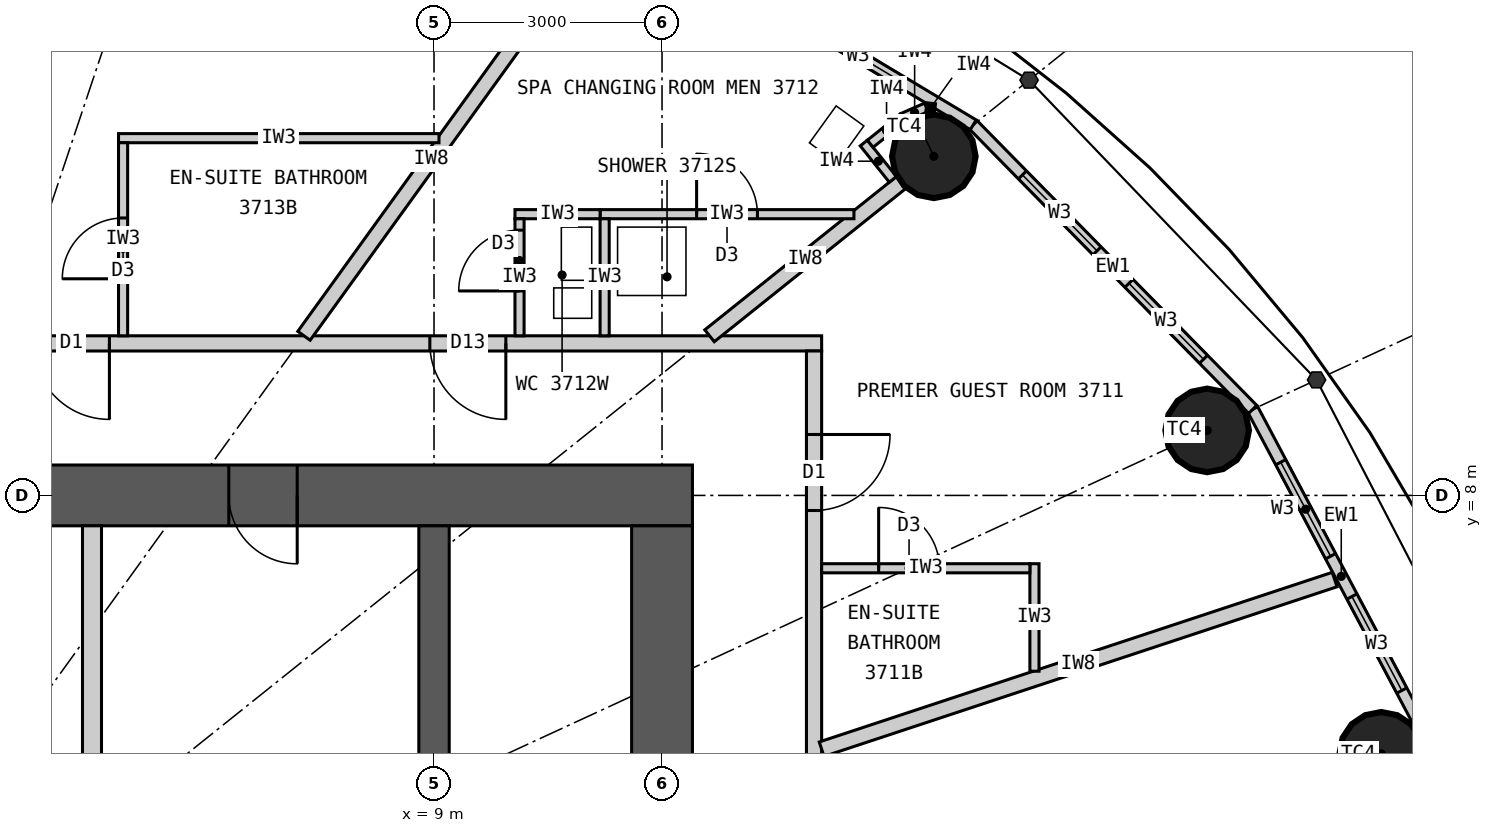
"""IFC4 building model, lengths in metres.
Left out: names, types, materials, properties, quantities, classifications, styles, units other than length and angle.
Written with IfcOpenShell. Run it as: python <this file> out.ifc"""

import sys

from ifc_helpers import new_model, si_unit, direction, frame, frame_2d, origin, origin_2d, place, context, subcontext, project, spatial, rectangle, circle, extrude, element, fill, save


model = new_model("IFC4")
c1 = context("Model", 3, precision=1e-05, world=origin(), true_north=direction((0.0, 1.0)))
c2 = subcontext(c1, "Body", "Model", "MODEL_VIEW")
j1 = project(units=[si_unit("LENGTHUNIT", "METRE"), si_unit("PLANEANGLEUNIT", "RADIAN")], contexts=[c1])
p1 = place(None, origin())
s1 = spatial("IfcSite", under=j1, at=p1, CompositionType="ELEMENT")
p2 = place(p1, origin())
s2 = spatial("IfcBuilding", under=s1, at=p2, CompositionType="ELEMENT")
p3 = place(p2, frame((0.0, 0.0, 143.4)))
s3 = spatial("IfcBuildingStorey", under=s2, at=p3, CompositionType="ELEMENT", Elevation=143.4)
for number, where, z_axis, x_axis in (
    (1, (21.463, 4.601, 0.0), (0.0, 0.0, 1.0), (1.0, 0.0, 0.0)),
    (2, (19.172, 8.855, 0.0), (0.0, 0.0, 1.0), (1.0, 0.0, 0.0)),
    (3, (15.576, 12.461, 0.0), (0.0, 0.0, 1.0), (1.0, 0.0, 0.0)),
):
    element("IfcColumn", number, at=place(p3, frame(where, z_axis=z_axis, x_axis=x_axis)), inside=s3, PredefinedType="COLUMN", context=c2, shape_type="SweptSolid", body=[
        extrude(circle(Radius=0.55, at=origin_2d()), origin(), (0.0, 0.0, 1.0), 3.3),
    ])
p4 = place(p3, frame((-12.4, 8.0, 0.0), z_axis=(0.0, 0.0, 1.0), x_axis=(1.0, 0.0, 0.0)))
e4 = element("IfcWall", 4, at=p4, inside=s3, PredefinedType="SHEAR", context=c2, shape_type="SweptSolid", body=[
    extrude(rectangle(XDim=24.8, YDim=0.8, at=frame_2d((12.4, 0.0))), origin(), (0.0, 0.0, 1.0), 3.3),
])
p5 = place(p4, frame((11.1, 0.0, 0.0)))
e5 = element("IfcOpeningElement", 5, at=p5, cuts=e4, PredefinedType="OPENING", context=c2, shape_type="SweptSolid", body=[
    extrude(rectangle(XDim=1.2, YDim=2.2, at=frame_2d((0.6, 1.1))), frame((0.0, 0.41, 0.0), z_axis=(0.0, -1.0, 0.0), x_axis=(1.0, 0.0, 0.0)), (0.0, 0.0, 1.0), 0.82),
])
p6 = place(p4, frame((18.7, 0.0, 0.0)))
e6 = element("IfcOpeningElement", 6, at=p6, cuts=e4, PredefinedType="OPENING", context=c2, shape_type="SweptSolid", body=[
    extrude(rectangle(XDim=0.9, YDim=2.2, at=frame_2d((0.45, 1.1))), frame((0.0, 0.41, 0.0), z_axis=(0.0, -1.0, 0.0), x_axis=(1.0, 0.0, 0.0)), (0.0, 0.0, 1.0), 0.82),
])
p7 = place(p3, frame((12.0, -7.6, 0.0), z_axis=(0.0, 0.0, 1.0), x_axis=(0.0, 1.0, 0.0)))
e7 = element("IfcWall", 7, at=p7, inside=s3, PredefinedType="SHEAR", context=c2, shape_type="SweptSolid", body=[
    extrude(rectangle(XDim=15.2, YDim=0.8, at=frame_2d((7.6, 0.0))), origin(), (0.0, 0.0, 1.0), 3.3),
])
p8 = place(p7, frame((6.7, 0.0, 0.0)))
e8 = element("IfcOpeningElement", 8, at=p8, cuts=e7, PredefinedType="OPENING", context=c2, shape_type="SweptSolid", body=[
    extrude(rectangle(XDim=1.8, YDim=2.2, at=frame_2d((0.9, 1.1))), frame((0.0, 0.41, 0.0), z_axis=(0.0, -1.0, 0.0), x_axis=(1.0, 0.0, 0.0)), (0.0, 0.0, 1.0), 0.82),
])
p9 = place(p3, frame((9.0, 4.5, 0.0), z_axis=(0.0, 0.0, 1.0), x_axis=(0.0, 1.0, 0.0)))
e9 = element("IfcWall", 9, at=p9, inside=s3, PredefinedType="SHEAR", context=c2, shape_type="SweptSolid", body=[
    extrude(rectangle(XDim=3.1, YDim=0.4, at=frame_2d((1.55, 0.0))), origin(), (0.0, 0.0, 1.0), 3.3),
])
p10 = place(p3, frame((4.5, 4.5, 0.0), z_axis=(0.0, 0.0, 1.0), x_axis=(0.0, 1.0, 0.0)))
e10 = element("IfcWall", 10, at=p10, inside=s3, PredefinedType="PARTITIONING", context=c2, shape_type="SweptSolid", body=[
    extrude(rectangle(XDim=3.1, YDim=0.25, at=frame_2d((1.55, 0.0))), origin(), (0.0, 0.0, 1.0), 3.3),
])
p11 = place(p3, frame((22.102, 4.738, 0.0), z_axis=(0.0, 0.0, 1.0), x_axis=(-0.468428906714, 0.883501193748, 0.0)))
e11 = element("IfcWall", 11, at=p11, inside=s3, PredefinedType="ELEMENTEDWALL", context=c2, shape_type="SweptSolid", body=[
    extrude(rectangle(XDim=4.974, YDim=0.15, at=frame_2d((2.487, 0.0))), origin(), (0.0, 0.0, 1.0), 3.12),
])
p12 = place(p11, frame((0.787, 0.0, 0.9)))
e12 = element("IfcOpeningElement", 12, at=p12, cuts=e11, PredefinedType="OPENING", context=c2, shape_type="SweptSolid", body=[
    extrude(rectangle(XDim=1.4, YDim=1.9, at=frame_2d((0.7, 0.95))), frame((0.0, 0.085, 0.0), z_axis=(0.0, -1.0, 0.0), x_axis=(1.0, 0.0, 0.0)), (0.0, 0.0, 1.0), 0.17),
])
p13 = place(p11, frame((2.787, 0.0, 0.9)))
e13 = element("IfcOpeningElement", 13, at=p13, cuts=e11, PredefinedType="OPENING", context=c2, shape_type="SweptSolid", body=[
    extrude(rectangle(XDim=1.4, YDim=1.9, at=frame_2d((0.7, 0.95))), frame((0.0, 0.085, 0.0), z_axis=(0.0, -1.0, 0.0), x_axis=(1.0, 0.0, 0.0)), (0.0, 0.0, 1.0), 0.17),
])
p14 = place(p3, frame((19.772, 9.132, 0.0), z_axis=(0.0, 0.0, 1.0), x_axis=(-0.700727467776, 0.71342905457, 0.0)))
e14 = element("IfcWall", 14, at=p14, inside=s3, PredefinedType="ELEMENTEDWALL", context=c2, shape_type="SweptSolid", body=[
    extrude(rectangle(XDim=5.247, YDim=0.15, at=frame_2d((2.624, 0.0))), origin(), (0.0, 0.0, 1.0), 3.12),
])
p15 = place(p14, frame((0.924, 0.0, 0.9)))
e15 = element("IfcOpeningElement", 15, at=p15, cuts=e14, PredefinedType="OPENING", context=c2, shape_type="SweptSolid", body=[
    extrude(rectangle(XDim=1.4, YDim=1.9, at=frame_2d((0.7, 0.95))), frame((0.0, 0.085, 0.0), z_axis=(0.0, -1.0, 0.0), x_axis=(1.0, 0.0, 0.0)), (0.0, 0.0, 1.0), 0.17),
])
p16 = place(p14, frame((2.924, 0.0, 0.9)))
e16 = element("IfcOpeningElement", 16, at=p16, cuts=e14, PredefinedType="OPENING", context=c2, shape_type="SweptSolid", body=[
    extrude(rectangle(XDim=1.4, YDim=1.9, at=frame_2d((0.7, 0.95))), frame((0.0, 0.085, 0.0), z_axis=(0.0, -1.0, 0.0), x_axis=(1.0, 0.0, 0.0)), (0.0, 0.0, 1.0), 0.17),
])
p17 = place(p3, frame((16.095, 12.876, 0.0), z_axis=(0.0, 0.0, 1.0), x_axis=(-0.857695199231, 0.514158482587, 0.0)))
e17 = element("IfcWall", 17, at=p17, inside=s3, PredefinedType="ELEMENTEDWALL", context=c2, shape_type="SweptSolid", body=[
    extrude(rectangle(XDim=5.536, YDim=0.15, at=frame_2d((2.768, 0.0))), origin(), (0.0, 0.0, 1.0), 3.12),
])
p18 = place(p17, frame((1.068, 0.0, 0.9)))
e18 = element("IfcOpeningElement", 18, at=p18, cuts=e17, PredefinedType="OPENING", context=c2, shape_type="SweptSolid", body=[
    extrude(rectangle(XDim=1.4, YDim=1.9, at=frame_2d((0.7, 0.95))), frame((0.0, 0.085, 0.0), z_axis=(0.0, -1.0, 0.0), x_axis=(1.0, 0.0, 0.0)), (0.0, 0.0, 1.0), 0.17),
])
p19 = place(p17, frame((3.068, 0.0, 0.9)))
e19 = element("IfcOpeningElement", 19, at=p19, cuts=e17, PredefinedType="OPENING", context=c2, shape_type="SweptSolid", body=[
    extrude(rectangle(XDim=1.4, YDim=1.9, at=frame_2d((0.7, 0.95))), frame((0.0, 0.085, 0.0), z_axis=(0.0, -1.0, 0.0), x_axis=(1.0, 0.0, 0.0)), (0.0, 0.0, 1.0), 0.17),
])
p20 = place(p3, frame((-14.1, 10.0, 0.0), z_axis=(0.0, 0.0, 1.0), x_axis=(1.0, 0.0, 0.0)))
e20 = element("IfcWall", 20, at=p20, inside=s3, PredefinedType="PARTITIONING", context=c2, shape_type="SweptSolid", body=[
    extrude(rectangle(XDim=28.2, YDim=0.2, at=frame_2d((14.1, 0.0))), origin(), (0.0, 0.0, 1.0), 3.12),
])
p21 = place(p20, frame((23.045, 0.0, 0.0)))
e21 = element("IfcOpeningElement", 21, at=p21, cuts=e20, PredefinedType="OPENING", context=c2, shape_type="SweptSolid", body=[
    extrude(rectangle(XDim=1.0, YDim=2.2, at=frame_2d((0.5, 1.1))), frame((0.0, 0.11, 0.0), z_axis=(0.0, -1.0, 0.0), x_axis=(1.0, 0.0, 0.0)), (0.0, 0.0, 1.0), 0.22),
])
p22 = place(p20, frame((17.829, 0.0, 0.0)))
e22 = element("IfcOpeningElement", 22, at=p22, cuts=e20, PredefinedType="OPENING", context=c2, shape_type="SweptSolid", body=[
    extrude(rectangle(XDim=1.0, YDim=2.2, at=frame_2d((0.5, 1.1))), frame((0.0, 0.11, 0.0), z_axis=(0.0, -1.0, 0.0), x_axis=(1.0, 0.0, 0.0)), (0.0, 0.0, 1.0), 0.22),
])
p23 = place(p20, frame((12.205, 0.0, 0.0)))
e23 = element("IfcOpeningElement", 23, at=p23, cuts=e20, PredefinedType="OPENING", context=c2, shape_type="SweptSolid", body=[
    extrude(rectangle(XDim=1.0, YDim=2.2, at=frame_2d((0.5, 1.1))), frame((0.0, 0.11, 0.0), z_axis=(0.0, -1.0, 0.0), x_axis=(1.0, 0.0, 0.0)), (0.0, 0.0, 1.0), 0.22),
])
p24 = place(p20, frame((7.857, 0.0, 0.0)))
e24 = element("IfcOpeningElement", 24, at=p24, cuts=e20, PredefinedType="OPENING", context=c2, shape_type="SweptSolid", body=[
    extrude(rectangle(XDim=1.0, YDim=2.2, at=frame_2d((0.5, 1.1))), frame((0.0, 0.11, 0.0), z_axis=(0.0, -1.0, 0.0), x_axis=(1.0, 0.0, 0.0)), (0.0, 0.0, 1.0), 0.22),
])
p25 = place(p20, frame((2.801, 0.0, 0.0)))
e25 = element("IfcOpeningElement", 25, at=p25, cuts=e20, PredefinedType="OPENING", context=c2, shape_type="SweptSolid", body=[
    extrude(rectangle(XDim=1.0, YDim=2.2, at=frame_2d((0.5, 1.1))), frame((0.0, 0.11, 0.0), z_axis=(0.0, -1.0, 0.0), x_axis=(1.0, 0.0, 0.0)), (0.0, 0.0, 1.0), 0.22),
])
p26 = place(p3, frame((14.0, -9.9, 0.0), z_axis=(0.0, 0.0, 1.0), x_axis=(0.0, 1.0, 0.0)))
e26 = element("IfcWall", 26, at=p26, inside=s3, PredefinedType="PARTITIONING", context=c2, shape_type="SweptSolid", body=[
    extrude(rectangle(XDim=19.8, YDim=0.2, at=frame_2d((9.9, 0.0))), origin(), (0.0, 0.0, 1.0), 3.12),
])
p27 = place(p26, frame((3.124, 0.0, 0.0)))
e27 = element("IfcOpeningElement", 27, at=p27, cuts=e26, PredefinedType="OPENING", context=c2, shape_type="SweptSolid", body=[
    extrude(rectangle(XDim=1.0, YDim=2.2, at=frame_2d((0.5, 1.1))), frame((0.0, 0.11, 0.0), z_axis=(0.0, -1.0, 0.0), x_axis=(1.0, 0.0, 0.0)), (0.0, 0.0, 1.0), 0.22),
])
p28 = place(p26, frame((6.574, 0.0, 0.0)))
e28 = element("IfcOpeningElement", 28, at=p28, cuts=e26, PredefinedType="OPENING", context=c2, shape_type="SweptSolid", body=[
    extrude(rectangle(XDim=1.6, YDim=2.4, at=frame_2d((0.8, 1.2))), frame((0.0, 0.11, 0.0), z_axis=(0.0, -1.0, 0.0), x_axis=(1.0, 0.0, 0.0)), (0.0, 0.0, 1.0), 0.22),
])
p29 = place(p26, frame((17.701, 0.0, 0.0)))
e29 = element("IfcOpeningElement", 29, at=p29, cuts=e26, PredefinedType="OPENING", context=c2, shape_type="SweptSolid", body=[
    extrude(rectangle(XDim=1.0, YDim=2.2, at=frame_2d((0.5, 1.1))), frame((0.0, 0.11, 0.0), z_axis=(0.0, -1.0, 0.0), x_axis=(1.0, 0.0, 0.0)), (0.0, 0.0, 1.0), 0.22),
])
p30 = place(p3, frame((14.1, 4.661, 0.0), z_axis=(0.0, 0.0, 1.0), x_axis=(0.949453216399, 0.313908569285, 0.0)))
e30 = element("IfcWall", 30, at=p30, inside=s3, PredefinedType="PARTITIONING", context=c2, shape_type="SweptSolid", body=[
    extrude(rectangle(XDim=7.109, YDim=0.2, at=frame_2d((3.554, 0.0))), origin(), (0.0, 0.0, 1.0), 3.12),
])
p31 = place(p3, frame((12.625, 10.1, 0.0), z_axis=(0.0, 0.0, 1.0), x_axis=(0.780876185034, 0.624685827954, 0.0)))
e31 = element("IfcWall", 31, at=p31, inside=s3, PredefinedType="PARTITIONING", context=c2, shape_type="SweptSolid", body=[
    extrude(rectangle(XDim=3.229, YDim=0.2, at=frame_2d((1.615, 0.0))), origin(), (0.0, 0.0, 1.0), 2.27),
])
p32 = place(p3, frame((7.289, 10.1, 0.0), z_axis=(0.0, 0.0, 1.0), x_axis=(0.585222595178, 0.810872686735, 0.0)))
e32 = element("IfcWall", 32, at=p32, inside=s3, PredefinedType="PARTITIONING", context=c2, shape_type="SweptSolid", body=[
    extrude(rectangle(XDim=5.722, YDim=0.2, at=frame_2d((2.861, 0.0))), origin(), (0.0, 0.0, 1.0), 2.27),
])
p33 = place(p3, frame((16.9, 5.687, 0.0), z_axis=(0.0, 0.0, 1.0), x_axis=(0.0, 1.0, 0.0)))
e33 = element("IfcWall", 33, at=p33, inside=s3, PredefinedType="PARTITIONING", context=c2, shape_type="SweptSolid", body=[
    extrude(rectangle(XDim=1.414, YDim=0.12, at=frame_2d((0.707, 0.0))), origin(), (0.0, 0.0, 1.0), 3.12),
])
p34 = place(p3, frame((14.1, 7.042, 0.0), z_axis=(0.0, 0.0, 1.0), x_axis=(1.0, 0.0, 0.0)))
e34 = element("IfcWall", 34, at=p34, inside=s3, PredefinedType="PARTITIONING", context=c2, shape_type="SweptSolid", body=[
    extrude(rectangle(XDim=2.74, YDim=0.12, at=frame_2d((1.37, 0.0))), origin(), (0.0, 0.0, 1.0), 3.12),
])
p35 = place(p34, frame((0.75, 0.0, 0.0)))
e35 = element("IfcOpeningElement", 35, at=p35, cuts=e34, PredefinedType="OPENING", context=c2, shape_type="SweptSolid", body=[
    extrude(rectangle(XDim=0.8, YDim=2.1, at=frame_2d((0.4, 1.05))), frame((0.0, 0.07, 0.0), z_axis=(0.0, -1.0, 0.0), x_axis=(1.0, 0.0, 0.0)), (0.0, 0.0, 1.0), 0.14),
])
p36 = place(p3, frame((14.525, 11.7, 0.0), z_axis=(0.0, 0.0, 1.0), x_axis=(-1.0, 0.0, 0.0)))
e36 = element("IfcWall", 36, at=p36, inside=s3, PredefinedType="PARTITIONING", context=c2, shape_type="SweptSolid", body=[
    extrude(rectangle(XDim=3.34, YDim=0.12, at=frame_2d((1.67, 0.0))), origin(), (0.0, 0.0, 1.0), 3.12),
])
p37 = place(p36, frame((1.27, 0.0, 0.0)))
e37 = element("IfcOpeningElement", 37, at=p37, cuts=e36, PredefinedType="OPENING", context=c2, shape_type="SweptSolid", body=[
    extrude(rectangle(XDim=0.8, YDim=2.1, at=frame_2d((0.4, 1.05))), frame((0.0, 0.07, 0.0), z_axis=(0.0, -1.0, 0.0), x_axis=(1.0, 0.0, 0.0)), (0.0, 0.0, 1.0), 0.14),
])
p38 = place(p3, frame((11.245, 10.1, 0.0), z_axis=(0.0, 0.0, 1.0), x_axis=(0.0, 1.0, 0.0)))
e38 = element("IfcWall", 38, at=p38, inside=s3, PredefinedType="PARTITIONING", context=c2, shape_type="SweptSolid", body=[
    extrude(rectangle(XDim=1.54, YDim=0.12, at=frame_2d((0.77, 0.0))), origin(), (0.0, 0.0, 1.0), 3.12),
])
p39 = place(p3, frame((11.185, 11.7, 0.0), z_axis=(0.0, 0.0, 1.0), x_axis=(-1.0, 0.0, 0.0)))
e39 = element("IfcWall", 39, at=p39, inside=s3, PredefinedType="PARTITIONING", context=c2, shape_type="SweptSolid", body=[
    extrude(rectangle(XDim=1.12, YDim=0.12, at=frame_2d((0.56, 0.0))), origin(), (0.0, 0.0, 1.0), 3.12),
])
p40 = place(p3, frame((10.125, 10.1, 0.0), z_axis=(0.0, 0.0, 1.0), x_axis=(0.0, 1.0, 0.0)))
e40 = element("IfcWall", 40, at=p40, inside=s3, PredefinedType="PARTITIONING", context=c2, shape_type="SweptSolid", body=[
    extrude(rectangle(XDim=1.54, YDim=0.12, at=frame_2d((0.77, 0.0))), origin(), (0.0, 0.0, 1.0), 3.12),
])
p41 = place(p40, frame((0.59, 0.0, 0.0)))
e41 = element("IfcOpeningElement", 41, at=p41, cuts=e40, PredefinedType="OPENING", context=c2, shape_type="SweptSolid", body=[
    extrude(rectangle(XDim=0.8, YDim=2.1, at=frame_2d((0.4, 1.05))), frame((0.0, 0.07, 0.0), z_axis=(0.0, -1.0, 0.0), x_axis=(1.0, 0.0, 0.0)), (0.0, 0.0, 1.0), 0.14),
])
p42 = place(p3, frame((9.065, 12.7, 0.0), z_axis=(0.0, 0.0, 1.0), x_axis=(-1.0, 0.0, 0.0)))
e42 = element("IfcWall", 42, at=p42, inside=s3, PredefinedType="PARTITIONING", context=c2, shape_type="SweptSolid", body=[
    extrude(rectangle(XDim=4.216, YDim=0.12, at=frame_2d((2.108, 0.0))), origin(), (0.0, 0.0, 1.0), 3.12),
])
p43 = place(p3, frame((4.909, 10.1, 0.0), z_axis=(0.0, 0.0, 1.0), x_axis=(0.0, 1.0, 0.0)))
e43 = element("IfcWall", 43, at=p43, inside=s3, PredefinedType="PARTITIONING", context=c2, shape_type="SweptSolid", body=[
    extrude(rectangle(XDim=2.54, YDim=0.12, at=frame_2d((1.27, 0.0))), origin(), (0.0, 0.0, 1.0), 3.12),
])
p44 = place(p43, frame((0.75, 0.0, 0.0)))
e44 = element("IfcOpeningElement", 44, at=p44, cuts=e43, PredefinedType="OPENING", context=c2, shape_type="SweptSolid", body=[
    extrude(rectangle(XDim=0.8, YDim=2.1, at=frame_2d((0.4, 1.05))), frame((0.0, 0.07, 0.0), z_axis=(0.0, -1.0, 0.0), x_axis=(1.0, 0.0, 0.0)), (0.0, 0.0, 1.0), 0.14),
])
p45 = place(p3, frame((15.037, 12.158, 0.0), z_axis=(0.0, 0.0, 1.0), x_axis=(-0.624840920722, 0.78075208856, 0.0)))
e45 = element("IfcWall", 45, at=p45, inside=s3, PredefinedType="PARTITIONING", context=c2, shape_type="SweptSolid", body=[
    extrude(rectangle(XDim=0.612, YDim=0.12, at=frame_2d((0.306, 0.0))), origin(), (0.0, 0.0, 1.0), 3.12),
])
p46 = place(p3, frame((14.739, 12.627, 0.0), z_axis=(0.0, 0.0, 1.0), x_axis=(0.780912119987, 0.624640905527, 0.0)))
e46 = element("IfcWall", 46, at=p46, inside=s3, PredefinedType="PARTITIONING", context=c2, shape_type="SweptSolid", body=[
    extrude(rectangle(XDim=0.55, YDim=0.12, at=frame_2d((0.275, 0.0))), origin(), (0.0, 0.0, 1.0), 3.12),
])
p47 = place(p3, frame((15.169, 12.97, 0.0), z_axis=(0.0, 0.0, 1.0), x_axis=(0.915974725257, 0.401235968838, 0.0)))
e47 = element("IfcWall", 47, at=p47, inside=s3, PredefinedType="PARTITIONING", context=c2, shape_type="SweptSolid", body=[
    extrude(rectangle(XDim=0.338, YDim=0.12, at=frame_2d((0.169, 0.0))), origin(), (0.0, 0.0, 1.0), 3.12),
])
p48 = place(p3, frame((15.478, 13.106, 0.0), z_axis=(0.0, 0.0, 1.0), x_axis=(0.993778813557, -0.111371763588, 0.0)))
e48 = element("IfcWall", 48, at=p48, inside=s3, PredefinedType="PARTITIONING", context=c2, shape_type="SweptSolid", body=[
    extrude(rectangle(XDim=0.114, YDim=0.12, at=frame_2d((0.057, 0.0))), origin(), (0.0, 0.0, 1.0), 3.12),
])
p49 = place(p12, origin())
e49 = element("IfcWindow", 49, at=p49, inside=s3, PartitioningType="SINGLE_PANEL", PredefinedType="WINDOW", context=c2, shape_type="SweptSolid", body=[
    extrude(rectangle(XDim=1.4, YDim=1.9, at=frame_2d((0.7, 0.95))), frame((0.0, 0.03, 0.0), z_axis=(0.0, -1.0, 0.0), x_axis=(1.0, 0.0, 0.0)), (0.0, 0.0, 1.0), 0.06),
])
fill(e12, e49)
p50 = place(p13, origin())
e50 = element("IfcWindow", 50, at=p50, inside=s3, PartitioningType="SINGLE_PANEL", PredefinedType="WINDOW", context=c2, shape_type="SweptSolid", body=[
    extrude(rectangle(XDim=1.4, YDim=1.9, at=frame_2d((0.7, 0.95))), frame((0.0, 0.03, 0.0), z_axis=(0.0, -1.0, 0.0), x_axis=(1.0, 0.0, 0.0)), (0.0, 0.0, 1.0), 0.06),
])
fill(e13, e50)
p51 = place(p15, origin())
e51 = element("IfcWindow", 51, at=p51, inside=s3, PartitioningType="SINGLE_PANEL", PredefinedType="WINDOW", context=c2, shape_type="SweptSolid", body=[
    extrude(rectangle(XDim=1.4, YDim=1.9, at=frame_2d((0.7, 0.95))), frame((0.0, 0.03, 0.0), z_axis=(0.0, -1.0, 0.0), x_axis=(1.0, 0.0, 0.0)), (0.0, 0.0, 1.0), 0.06),
])
fill(e15, e51)
p52 = place(p16, origin())
e52 = element("IfcWindow", 52, at=p52, inside=s3, PartitioningType="SINGLE_PANEL", PredefinedType="WINDOW", context=c2, shape_type="SweptSolid", body=[
    extrude(rectangle(XDim=1.4, YDim=1.9, at=frame_2d((0.7, 0.95))), frame((0.0, 0.03, 0.0), z_axis=(0.0, -1.0, 0.0), x_axis=(1.0, 0.0, 0.0)), (0.0, 0.0, 1.0), 0.06),
])
fill(e16, e52)
p53 = place(p18, origin())
e53 = element("IfcWindow", 53, at=p53, inside=s3, PartitioningType="SINGLE_PANEL", PredefinedType="WINDOW", context=c2, shape_type="SweptSolid", body=[
    extrude(rectangle(XDim=1.4, YDim=1.9, at=frame_2d((0.7, 0.95))), frame((0.0, 0.03, 0.0), z_axis=(0.0, -1.0, 0.0), x_axis=(1.0, 0.0, 0.0)), (0.0, 0.0, 1.0), 0.06),
])
fill(e18, e53)
p54 = place(p35, origin())
e54 = element("IfcDoor", 54, at=p54, inside=s3, OperationType="SINGLE_SWING_LEFT", PredefinedType="DOOR", context=c2, shape_type="SweptSolid", body=[
    extrude(rectangle(XDim=0.8, YDim=2.1, at=frame_2d((0.4, 1.05))), frame((0.0, 0.025, 0.0), z_axis=(0.0, -1.0, 0.0), x_axis=(1.0, 0.0, 0.0)), (0.0, 0.0, 1.0), 0.05),
])
fill(e35, e54)
p55 = place(p29, origin())
e55 = element("IfcDoor", 55, at=p55, inside=s3, OperationType="SINGLE_SWING_RIGHT", PredefinedType="DOOR", context=c2, shape_type="SweptSolid", body=[
    extrude(rectangle(XDim=1.0, YDim=2.2, at=frame_2d((0.5, 1.1))), frame((0.0, 0.025, 0.0), z_axis=(0.0, -1.0, 0.0), x_axis=(1.0, 0.0, 0.0)), (0.0, 0.0, 1.0), 0.05),
])
fill(e29, e55)
p56 = place(p37, origin())
e56 = element("IfcDoor", 56, at=p56, inside=s3, OperationType="SINGLE_SWING_RIGHT", PredefinedType="DOOR", context=c2, shape_type="SweptSolid", body=[
    extrude(rectangle(XDim=0.8, YDim=2.1, at=frame_2d((0.4, 1.05))), frame((0.0, 0.025, 0.0), z_axis=(0.0, -1.0, 0.0), x_axis=(1.0, 0.0, 0.0)), (0.0, 0.0, 1.0), 0.05),
])
fill(e37, e56)
p57 = place(p41, origin())
e57 = element("IfcDoor", 57, at=p57, inside=s3, OperationType="SINGLE_SWING_LEFT", PredefinedType="DOOR", context=c2, shape_type="SweptSolid", body=[
    extrude(rectangle(XDim=0.8, YDim=2.1, at=frame_2d((0.4, 1.05))), frame((0.0, 0.025, 0.0), z_axis=(0.0, -1.0, 0.0), x_axis=(1.0, 0.0, 0.0)), (0.0, 0.0, 1.0), 0.05),
])
fill(e41, e57)
p58 = place(p21, origin())
e58 = element("IfcDoor", 58, at=p58, inside=s3, OperationType="SINGLE_SWING_RIGHT", PredefinedType="DOOR", context=c2, shape_type="SweptSolid", body=[
    extrude(rectangle(XDim=1.0, YDim=2.2, at=frame_2d((0.5, 1.1))), frame((0.0, 0.025, 0.0), z_axis=(0.0, -1.0, 0.0), x_axis=(1.0, 0.0, 0.0)), (0.0, 0.0, 1.0), 0.05),
])
fill(e21, e58)
p59 = place(p44, origin())
e59 = element("IfcDoor", 59, at=p59, inside=s3, OperationType="SINGLE_SWING_LEFT", PredefinedType="DOOR", context=c2, shape_type="SweptSolid", body=[
    extrude(rectangle(XDim=0.8, YDim=2.1, at=frame_2d((0.4, 1.05))), frame((0.0, 0.025, 0.0), z_axis=(0.0, -1.0, 0.0), x_axis=(1.0, 0.0, 0.0)), (0.0, 0.0, 1.0), 0.05),
])
fill(e44, e59)
p60 = place(p22, origin())
e60 = element("IfcDoor", 60, at=p60, inside=s3, OperationType="SINGLE_SWING_RIGHT", PredefinedType="DOOR", context=c2, shape_type="SweptSolid", body=[
    extrude(rectangle(XDim=1.0, YDim=2.2, at=frame_2d((0.5, 1.1))), frame((0.0, 0.025, 0.0), z_axis=(0.0, -1.0, 0.0), x_axis=(1.0, 0.0, 0.0)), (0.0, 0.0, 1.0), 0.05),
])
fill(e22, e60)
p61 = place(p6, origin())
e61 = element("IfcDoor", 61, at=p61, inside=s3, OperationType="SINGLE_SWING_RIGHT", PredefinedType="DOOR", context=c2, shape_type="SweptSolid", body=[
    extrude(rectangle(XDim=0.9, YDim=2.2, at=frame_2d((0.45, 1.1))), frame((0.0, 0.025, 0.0), z_axis=(0.0, -1.0, 0.0), x_axis=(1.0, 0.0, 0.0)), (0.0, 0.0, 1.0), 0.05),
])
fill(e6, e61)
save(model, sys.argv[1])
